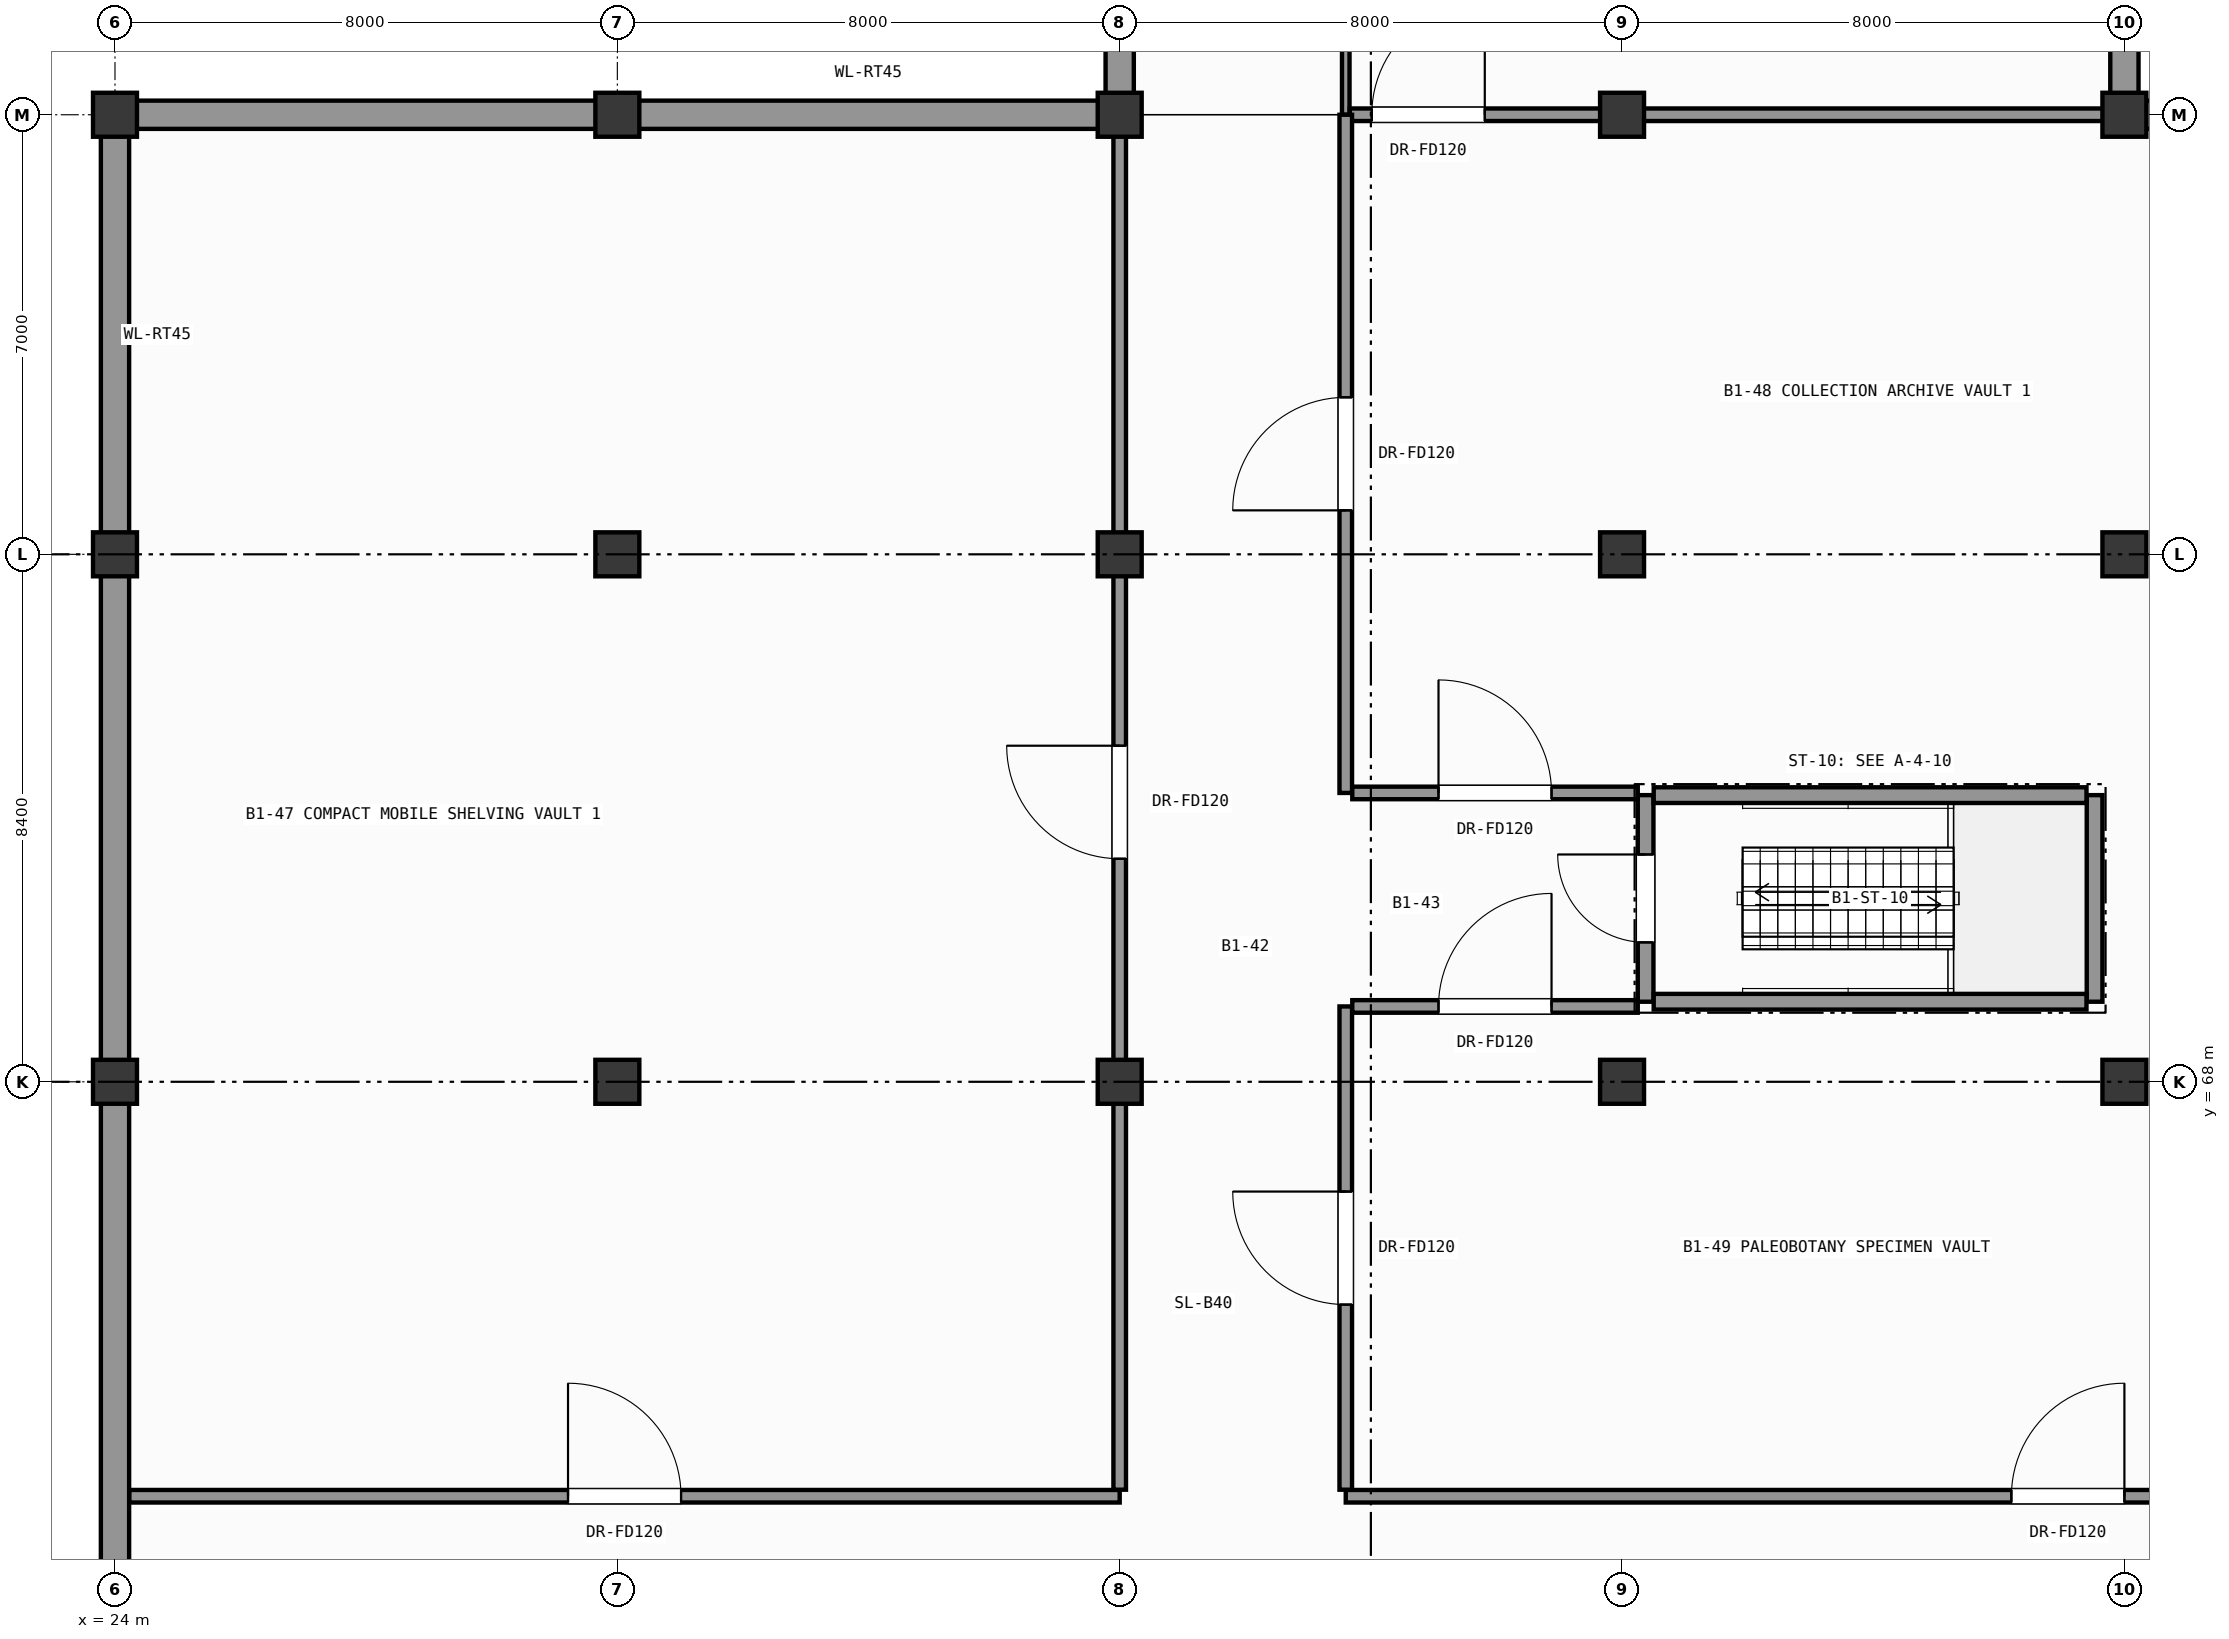
"""IFC4 building model, lengths in metres.
Left out: names, types, materials, properties, quantities, classifications, styles, units other than length and angle.
Written with IfcOpenShell. Run it as: python <this file> out.ifc"""

import sys

from ifc_helpers import new_model, si_unit, direction, frame, frame_2d, origin, origin_2d, place, context, subcontext, project, spatial, rectangle, extrude, element, fill, save


model = new_model("IFC4")
c1 = context("Model", 3, precision=1e-05, world=origin(), true_north=direction((0.0, 1.0)))
c2 = subcontext(c1, "Body", "Model", "MODEL_VIEW")
j1 = project(units=[si_unit("LENGTHUNIT", "METRE"), si_unit("PLANEANGLEUNIT", "RADIAN")], contexts=[c1])
p1 = place(None, origin())
s1 = spatial("IfcSite", under=j1, at=p1, CompositionType="ELEMENT")
p2 = place(p1, origin())
s2 = spatial("IfcBuilding", under=s1, at=p2, CompositionType="ELEMENT")
p3 = place(p2, frame((0.0, 0.0, -4.8)))
s3 = spatial("IfcBuildingStorey", under=s2, at=p3, CompositionType="ELEMENT", Elevation=-4.8)
for number, where, z_axis, x_axis in (
    (1, (24.0, 68.0, 0.0), (0.0, 0.0, 1.0), (1.0, 0.0, 0.0)),
    (2, (24.0, 76.4, 0.0), (0.0, 0.0, 1.0), (1.0, 0.0, 0.0)),
    (3, (24.0, 83.4, 0.0), (0.0, 0.0, 1.0), (1.0, 0.0, 0.0)),
    (4, (32.0, 68.0, 0.0), (0.0, 0.0, 1.0), (1.0, 0.0, 0.0)),
    (5, (32.0, 76.4, 0.0), (0.0, 0.0, 1.0), (1.0, 0.0, 0.0)),
    (6, (32.0, 83.4, 0.0), (0.0, 0.0, 1.0), (1.0, 0.0, 0.0)),
    (7, (40.0, 68.0, 0.0), (0.0, 0.0, 1.0), (1.0, 0.0, 0.0)),
    (8, (40.0, 76.4, 0.0), (0.0, 0.0, 1.0), (1.0, 0.0, 0.0)),
    (9, (40.0, 83.4, 0.0), (0.0, 0.0, 1.0), (1.0, 0.0, 0.0)),
    (10, (48.0, 68.0, 0.0), (0.0, 0.0, 1.0), (1.0, 0.0, 0.0)),
    (11, (48.0, 76.4, 0.0), (0.0, 0.0, 1.0), (1.0, 0.0, 0.0)),
    (12, (48.0, 83.4, 0.0), (0.0, 0.0, 1.0), (1.0, 0.0, 0.0)),
    (13, (56.0, 68.0, 0.0), (0.0, 0.0, 1.0), (1.0, 0.0, 0.0)),
    (14, (56.0, 76.4, 0.0), (0.0, 0.0, 1.0), (1.0, 0.0, 0.0)),
    (15, (56.0, 83.4, 0.0), (0.0, 0.0, 1.0), (1.0, 0.0, 0.0)),
):
    element("IfcColumn", number, at=place(p3, frame(where, z_axis=z_axis, x_axis=x_axis)), inside=s3, PredefinedType="COLUMN", context=c2, shape_type="SweptSolid", body=[
        extrude(rectangle(XDim=0.7, YDim=0.7, at=origin_2d()), origin(), (0.0, 0.0, 1.0), 4.8),
    ])
p4 = place(p3, frame((56.0, 83.4, 0.0), z_axis=(0.0, 0.0, 1.0), x_axis=(1.0, 0.0, 0.0)))
e16 = element("IfcWall", 16, at=p4, inside=s3, PredefinedType="USERDEFINED", context=c2, shape_type="SweptSolid", body=[
    extrude(rectangle(XDim=14.0, YDim=0.45, at=frame_2d((7.0, 0.0))), origin(), (0.0, 0.0, 1.0), 4.5),
])
p5 = place(p3, frame((56.0, 90.4, 0.0), z_axis=(0.0, 0.0, 1.0), x_axis=(0.0, -1.0, 0.0)))
e17 = element("IfcWall", 17, at=p5, inside=s3, PredefinedType="USERDEFINED", context=c2, shape_type="SweptSolid", body=[
    extrude(rectangle(XDim=6.771, YDim=0.45, at=frame_2d((3.385, 0.0))), origin(), (0.0, 0.0, 1.0), 4.5),
])
p6 = place(p3, frame((40.0, 83.4, 0.0), z_axis=(0.0, 0.0, 1.0), x_axis=(0.0, 1.0, 0.0)))
e18 = element("IfcWall", 18, at=p6, inside=s3, PredefinedType="USERDEFINED", context=c2, shape_type="SweptSolid", body=[
    extrude(rectangle(XDim=7.0, YDim=0.45, at=frame_2d((3.5, 0.0))), origin(), (0.0, 0.0, 1.0), 4.5),
])
p7 = place(p3, frame((32.0, 83.4, 0.0), z_axis=(0.0, 0.0, 1.0), x_axis=(1.0, 0.0, 0.0)))
e19 = element("IfcWall", 19, at=p7, inside=s3, PredefinedType="USERDEFINED", context=c2, shape_type="SweptSolid", body=[
    extrude(rectangle(XDim=7.771, YDim=0.45, at=frame_2d((3.885, 0.0))), origin(), (0.0, 0.0, 1.0), 4.5),
])
p8 = place(p3, frame((24.0, 83.4, 0.0), z_axis=(0.0, 0.0, 1.0), x_axis=(1.0, 0.0, 0.0)))
e20 = element("IfcWall", 20, at=p8, inside=s3, PredefinedType="USERDEFINED", context=c2, shape_type="SweptSolid", body=[
    extrude(rectangle(XDim=8.0, YDim=0.45, at=frame_2d((4.0, 0.0))), origin(), (0.0, 0.0, 1.0), 4.5),
])
p9 = place(p3, frame((24.0, 76.4, 0.0), z_axis=(0.0, 0.0, 1.0), x_axis=(0.0, 1.0, 0.0)))
e21 = element("IfcWall", 21, at=p9, inside=s3, PredefinedType="USERDEFINED", context=c2, shape_type="SweptSolid", body=[
    extrude(rectangle(XDim=6.771, YDim=0.45, at=frame_2d((3.385, 0.0))), origin(), (0.0, 0.0, 1.0), 4.5),
])
for number, where, z_axis, x_axis in (
    (22, (24.0, 68.0, 0.0), (0.0, 0.0, 1.0), (0.0, 1.0, 0.0)),
    (23, (24.0, 59.6, 0.0), (0.0, 0.0, 1.0), (0.0, 1.0, 0.0)),
):
    element("IfcWall", number, at=place(p3, frame(where, z_axis=z_axis, x_axis=x_axis)), inside=s3, PredefinedType="USERDEFINED", context=c2, shape_type="SweptSolid", body=[
        extrude(rectangle(XDim=8.4, YDim=0.45, at=frame_2d((4.2, 0.0))), origin(), (0.0, 0.0, 1.0), 4.5),
    ])
p10 = place(p3, frame((48.375, 69.275, 0.0), z_axis=(0.0, 0.0, 1.0), x_axis=(0.0, 1.0, 0.0)))
e24 = element("IfcWall", 24, at=p10, inside=s3, PredefinedType="SHEAR", context=c2, shape_type="SweptSolid", body=[
    extrude(rectangle(XDim=3.29, YDim=0.25, at=frame_2d((1.645, 0.0))), origin(), (0.0, 0.0, 1.0), 4.5),
])
p11 = place(p10, frame((0.945, 0.0, 0.0)))
e25 = element("IfcOpeningElement", 25, at=p11, cuts=e24, PredefinedType="OPENING", context=c2, shape_type="SweptSolid", body=[
    extrude(rectangle(XDim=1.4, YDim=2.2, at=frame_2d((0.7, 1.1))), frame((0.0, 0.135, 0.0), z_axis=(0.0, -1.0, 0.0), x_axis=(1.0, 0.0, 0.0)), (0.0, 0.0, 1.0), 0.27),
])
p12 = place(p3, frame((55.525, 69.275, 0.0), z_axis=(0.0, 0.0, 1.0), x_axis=(0.0, 1.0, 0.0)))
e26 = element("IfcWall", 26, at=p12, inside=s3, PredefinedType="SHEAR", context=c2, shape_type="SweptSolid", body=[
    extrude(rectangle(XDim=3.29, YDim=0.25, at=frame_2d((1.645, 0.0))), origin(), (0.0, 0.0, 1.0), 4.5),
])
for number, where, z_axis, x_axis in (
    (27, (48.504, 69.275, 0.0), (0.0, 0.0, 1.0), (1.0, 0.0, 0.0)),
    (28, (48.504, 72.565, 0.0), (0.0, 0.0, 1.0), (1.0, 0.0, 0.0)),
):
    element("IfcWall", number, at=place(p3, frame(where, z_axis=z_axis, x_axis=x_axis)), inside=s3, PredefinedType="SHEAR", context=c2, shape_type="SweptSolid", body=[
        extrude(rectangle(XDim=6.892, YDim=0.25, at=frame_2d((3.446, 0.0))), origin(), (0.0, 0.0, 1.0), 4.5),
    ])
p13 = place(p3, frame((43.6, 83.4, 0.0), z_axis=(0.0, 0.0, 1.0), x_axis=(0.0, 1.0, 0.0)))
e29 = element("IfcWall", 29, at=p13, inside=s3, PredefinedType="PARTITIONING", context=c2, shape_type="SweptSolid", body=[
    extrude(rectangle(XDim=9.8, YDim=0.12, at=frame_2d((4.9, 0.0))), origin(), (0.0, 0.0, 1.0), 4.5),
])
p14 = place(p13, frame((4.3, 0.0, 0.0)))
e30 = element("IfcOpeningElement", 30, at=p14, cuts=e29, PredefinedType="OPENING", context=c2, shape_type="SweptSolid", body=[
    extrude(rectangle(XDim=1.2, YDim=2.2, at=frame_2d((0.6, 1.1))), frame((0.0, 0.07, 0.0), z_axis=(0.0, -1.0, 0.0), x_axis=(1.0, 0.0, 0.0)), (0.0, 0.0, 1.0), 0.14),
])
p15 = place(p3, frame((43.664, 83.4, 0.0), z_axis=(0.0, 0.0, 1.0), x_axis=(1.0, 0.0, 0.0)))
e31 = element("IfcWall", 31, at=p15, inside=s3, PredefinedType="PARTITIONING", context=c2, shape_type="SweptSolid", body=[
    extrude(rectangle(XDim=12.336, YDim=0.2, at=frame_2d((6.168, 0.0))), origin(), (0.0, 0.0, 1.0), 4.015),
])
p16 = place(p15, frame((0.35, 0.0, 0.0)))
e32 = element("IfcOpeningElement", 32, at=p16, cuts=e31, PredefinedType="OPENING", context=c2, shape_type="SweptSolid", body=[
    extrude(rectangle(XDim=1.8, YDim=2.4, at=frame_2d((0.9, 1.2))), frame((0.0, 0.11, 0.0), z_axis=(0.0, -1.0, 0.0), x_axis=(1.0, 0.0, 0.0)), (0.0, 0.0, 1.0), 0.22),
])
p17 = place(p3, frame((24.229, 61.4, 0.0), z_axis=(0.0, 0.0, 1.0), x_axis=(1.0, 0.0, 0.0)))
e33 = element("IfcWall", 33, at=p17, inside=s3, PredefinedType="PARTITIONING", context=c2, shape_type="SweptSolid", body=[
    extrude(rectangle(XDim=15.771, YDim=0.2, at=frame_2d((7.885, 0.0))), origin(), (0.0, 0.0, 1.0), 4.5),
])
p18 = place(p17, frame((6.986, 0.0, 0.0)))
e34 = element("IfcOpeningElement", 34, at=p18, cuts=e33, PredefinedType="OPENING", context=c2, shape_type="SweptSolid", body=[
    extrude(rectangle(XDim=1.8, YDim=2.4, at=frame_2d((0.9, 1.2))), frame((0.0, 0.11, 0.0), z_axis=(0.0, -1.0, 0.0), x_axis=(1.0, 0.0, 0.0)), (0.0, 0.0, 1.0), 0.22),
])
p19 = place(p3, frame((43.6, 61.4, 0.0), z_axis=(0.0, 0.0, 1.0), x_axis=(1.0, 0.0, 0.0)))
e35 = element("IfcWall", 35, at=p19, inside=s3, PredefinedType="PARTITIONING", context=c2, shape_type="SweptSolid", body=[
    extrude(rectangle(XDim=23.0, YDim=0.2, at=frame_2d((11.5, 0.0))), origin(), (0.0, 0.0, 1.0), 4.5),
])
p20 = place(p19, frame((10.6, 0.0, 0.0)))
e36 = element("IfcOpeningElement", 36, at=p20, cuts=e35, PredefinedType="OPENING", context=c2, shape_type="SweptSolid", body=[
    extrude(rectangle(XDim=1.8, YDim=2.4, at=frame_2d((0.9, 1.2))), frame((0.0, 0.11, 0.0), z_axis=(0.0, -1.0, 0.0), x_axis=(1.0, 0.0, 0.0)), (0.0, 0.0, 1.0), 0.22),
])
p21 = place(p3, frame((40.0, 61.504, 0.0), z_axis=(0.0, 0.0, 1.0), x_axis=(0.0, 1.0, 0.0)))
e37 = element("IfcWall", 37, at=p21, inside=s3, PredefinedType="PARTITIONING", context=c2, shape_type="SweptSolid", body=[
    extrude(rectangle(XDim=21.896, YDim=0.2, at=frame_2d((10.948, 0.0))), origin(), (0.0, 0.0, 1.0), 3.915),
])
p22 = place(p21, frame((10.048, 0.0, 0.0)))
e38 = element("IfcOpeningElement", 38, at=p22, cuts=e37, PredefinedType="OPENING", context=c2, shape_type="SweptSolid", body=[
    extrude(rectangle(XDim=1.8, YDim=2.4, at=frame_2d((0.9, 1.2))), frame((0.0, 0.11, 0.0), z_axis=(0.0, -1.0, 0.0), x_axis=(1.0, 0.0, 0.0)), (0.0, 0.0, 1.0), 0.22),
])
p23 = place(p3, frame((43.6, 72.6, 0.0), z_axis=(0.0, 0.0, 1.0), x_axis=(0.0, 1.0, 0.0)))
e39 = element("IfcWall", 39, at=p23, inside=s3, PredefinedType="PARTITIONING", context=c2, shape_type="SweptSolid", body=[
    extrude(rectangle(XDim=10.8, YDim=0.2, at=frame_2d((5.4, 0.0))), origin(), (0.0, 0.0, 1.0), 4.5),
])
p24 = place(p23, frame((4.5, 0.0, 0.0)))
e40 = element("IfcOpeningElement", 40, at=p24, cuts=e39, PredefinedType="OPENING", context=c2, shape_type="SweptSolid", body=[
    extrude(rectangle(XDim=1.8, YDim=2.4, at=frame_2d((0.9, 1.2))), frame((0.0, 0.11, 0.0), z_axis=(0.0, -1.0, 0.0), x_axis=(1.0, 0.0, 0.0)), (0.0, 0.0, 1.0), 0.22),
])
p25 = place(p3, frame((43.6, 61.504, 0.0), z_axis=(0.0, 0.0, 1.0), x_axis=(0.0, 1.0, 0.0)))
e41 = element("IfcWall", 41, at=p25, inside=s3, PredefinedType="PARTITIONING", context=c2, shape_type="SweptSolid", body=[
    extrude(rectangle(XDim=7.696, YDim=0.2, at=frame_2d((3.848, 0.0))), origin(), (0.0, 0.0, 1.0), 4.5),
])
p26 = place(p25, frame((2.948, 0.0, 0.0)))
e42 = element("IfcOpeningElement", 42, at=p26, cuts=e41, PredefinedType="OPENING", context=c2, shape_type="SweptSolid", body=[
    extrude(rectangle(XDim=1.8, YDim=2.4, at=frame_2d((0.9, 1.2))), frame((0.0, 0.11, 0.0), z_axis=(0.0, -1.0, 0.0), x_axis=(1.0, 0.0, 0.0)), (0.0, 0.0, 1.0), 0.22),
])
p27 = place(p3, frame((43.704, 72.6, 0.0), z_axis=(0.0, 0.0, 1.0), x_axis=(1.0, 0.0, 0.0)))
e43 = element("IfcWall", 43, at=p27, inside=s3, PredefinedType="PARTITIONING", context=c2, shape_type="SweptSolid", body=[
    extrude(rectangle(XDim=4.546, YDim=0.2, at=frame_2d((2.273, 0.0))), origin(), (0.0, 0.0, 1.0), 4.5),
])
p28 = place(p27, frame((1.373, 0.0, 0.0)))
e44 = element("IfcOpeningElement", 44, at=p28, cuts=e43, PredefinedType="OPENING", context=c2, shape_type="SweptSolid", body=[
    extrude(rectangle(XDim=1.8, YDim=2.4, at=frame_2d((0.9, 1.2))), frame((0.0, 0.11, 0.0), z_axis=(0.0, -1.0, 0.0), x_axis=(1.0, 0.0, 0.0)), (0.0, 0.0, 1.0), 0.22),
])
p29 = place(p3, frame((43.704, 69.2, 0.0), z_axis=(0.0, 0.0, 1.0), x_axis=(1.0, 0.0, 0.0)))
e45 = element("IfcWall", 45, at=p29, inside=s3, PredefinedType="PARTITIONING", context=c2, shape_type="SweptSolid", body=[
    extrude(rectangle(XDim=4.546, YDim=0.2, at=frame_2d((2.273, 0.0))), origin(), (0.0, 0.0, 1.0), 4.5),
])
p30 = place(p29, frame((1.373, 0.0, 0.0)))
e46 = element("IfcOpeningElement", 46, at=p30, cuts=e45, PredefinedType="OPENING", context=c2, shape_type="SweptSolid", body=[
    extrude(rectangle(XDim=1.8, YDim=2.4, at=frame_2d((0.9, 1.2))), frame((0.0, 0.11, 0.0), z_axis=(0.0, -1.0, 0.0), x_axis=(1.0, 0.0, 0.0)), (0.0, 0.0, 1.0), 0.22),
])
p31 = place(p11, origin())
e47 = element("IfcDoor", 47, at=p31, inside=s3, OperationType="SINGLE_SWING_RIGHT", PredefinedType="DOOR", context=c2, shape_type="SweptSolid", body=[
    extrude(rectangle(XDim=1.4, YDim=2.2, at=frame_2d((0.7, 1.1))), frame((0.0, 0.025, 0.0), z_axis=(0.0, -1.0, 0.0), x_axis=(1.0, 0.0, 0.0)), (0.0, 0.0, 1.0), 0.05),
])
fill(e25, e47)
p32 = place(p16, origin())
e48 = element("IfcDoor", 48, at=p32, inside=s3, OperationType="SINGLE_SWING_RIGHT", PredefinedType="DOOR", context=c2, shape_type="SweptSolid", body=[
    extrude(rectangle(XDim=1.8, YDim=2.4, at=frame_2d((0.9, 1.2))), frame((0.0, 0.025, 0.0), z_axis=(0.0, -1.0, 0.0), x_axis=(1.0, 0.0, 0.0)), (0.0, 0.0, 1.0), 0.05),
])
fill(e32, e48)
p33 = place(p18, origin())
e49 = element("IfcDoor", 49, at=p33, inside=s3, OperationType="SINGLE_SWING_LEFT", PredefinedType="DOOR", context=c2, shape_type="SweptSolid", body=[
    extrude(rectangle(XDim=1.8, YDim=2.4, at=frame_2d((0.9, 1.2))), frame((0.0, 0.025, 0.0), z_axis=(0.0, -1.0, 0.0), x_axis=(1.0, 0.0, 0.0)), (0.0, 0.0, 1.0), 0.05),
])
fill(e34, e49)
p34 = place(p20, origin())
e50 = element("IfcDoor", 50, at=p34, inside=s3, OperationType="SINGLE_SWING_RIGHT", PredefinedType="DOOR", context=c2, shape_type="SweptSolid", body=[
    extrude(rectangle(XDim=1.8, YDim=2.4, at=frame_2d((0.9, 1.2))), frame((0.0, 0.025, 0.0), z_axis=(0.0, -1.0, 0.0), x_axis=(1.0, 0.0, 0.0)), (0.0, 0.0, 1.0), 0.05),
])
fill(e36, e50)
p35 = place(p22, origin())
e51 = element("IfcDoor", 51, at=p35, inside=s3, OperationType="SINGLE_SWING_RIGHT", PredefinedType="DOOR", context=c2, shape_type="SweptSolid", body=[
    extrude(rectangle(XDim=1.8, YDim=2.4, at=frame_2d((0.9, 1.2))), frame((0.0, 0.025, 0.0), z_axis=(0.0, -1.0, 0.0), x_axis=(1.0, 0.0, 0.0)), (0.0, 0.0, 1.0), 0.05),
])
fill(e38, e51)
p36 = place(p24, origin())
e52 = element("IfcDoor", 52, at=p36, inside=s3, OperationType="SINGLE_SWING_LEFT", PredefinedType="DOOR", context=c2, shape_type="SweptSolid", body=[
    extrude(rectangle(XDim=1.8, YDim=2.4, at=frame_2d((0.9, 1.2))), frame((0.0, 0.025, 0.0), z_axis=(0.0, -1.0, 0.0), x_axis=(1.0, 0.0, 0.0)), (0.0, 0.0, 1.0), 0.05),
])
fill(e40, e52)
p37 = place(p26, origin())
e53 = element("IfcDoor", 53, at=p37, inside=s3, OperationType="SINGLE_SWING_RIGHT", PredefinedType="DOOR", context=c2, shape_type="SweptSolid", body=[
    extrude(rectangle(XDim=1.8, YDim=2.4, at=frame_2d((0.9, 1.2))), frame((0.0, 0.025, 0.0), z_axis=(0.0, -1.0, 0.0), x_axis=(1.0, 0.0, 0.0)), (0.0, 0.0, 1.0), 0.05),
])
fill(e42, e53)
p38 = place(p28, origin())
e54 = element("IfcDoor", 54, at=p38, inside=s3, OperationType="SINGLE_SWING_LEFT", PredefinedType="DOOR", context=c2, shape_type="SweptSolid", body=[
    extrude(rectangle(XDim=1.8, YDim=2.4, at=frame_2d((0.9, 1.2))), frame((0.0, 0.025, 0.0), z_axis=(0.0, -1.0, 0.0), x_axis=(1.0, 0.0, 0.0)), (0.0, 0.0, 1.0), 0.05),
])
fill(e44, e54)
p39 = place(p30, origin())
e55 = element("IfcDoor", 55, at=p39, inside=s3, OperationType="SINGLE_SWING_RIGHT", PredefinedType="DOOR", context=c2, shape_type="SweptSolid", body=[
    extrude(rectangle(XDim=1.8, YDim=2.4, at=frame_2d((0.9, 1.2))), frame((0.0, 0.025, 0.0), z_axis=(0.0, -1.0, 0.0), x_axis=(1.0, 0.0, 0.0)), (0.0, 0.0, 1.0), 0.05),
])
fill(e46, e55)
save(model, sys.argv[1])
